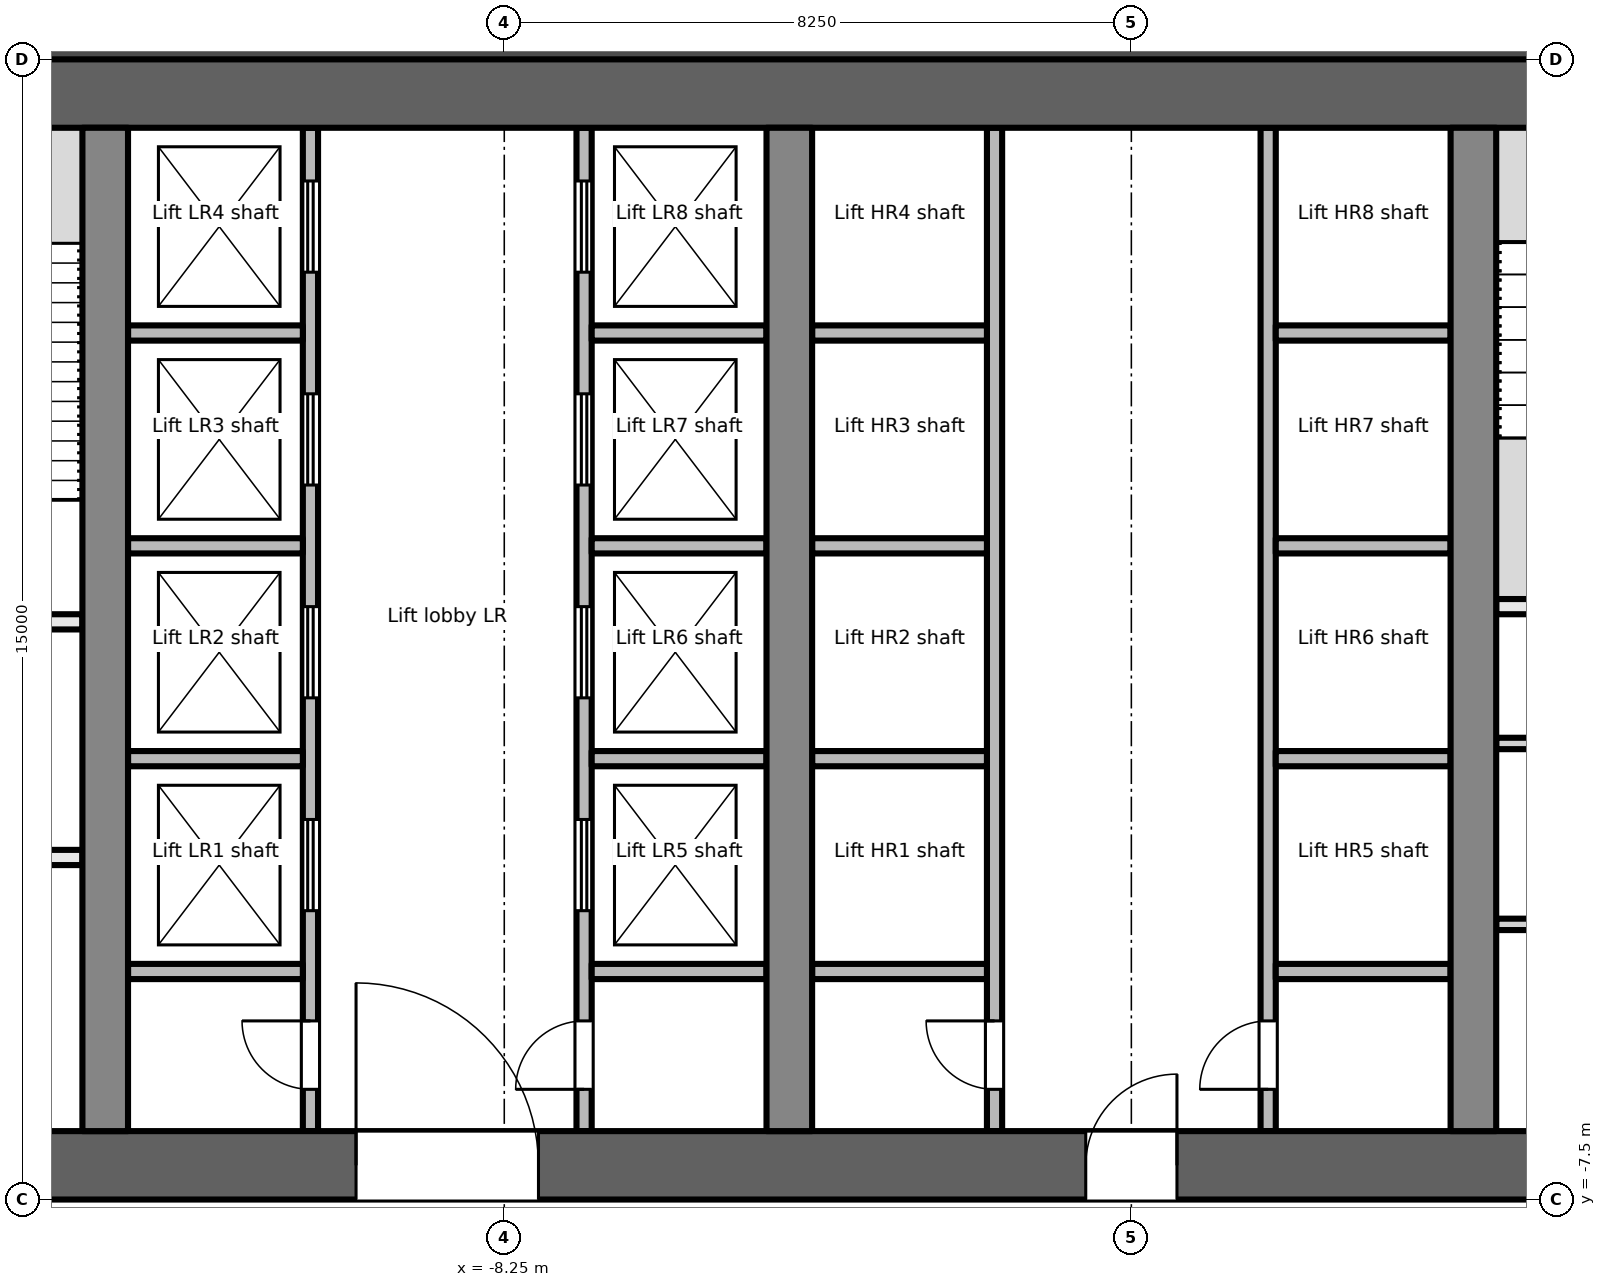
"""IFC4 building model, lengths in metres.
Left out: names, types, materials, properties, quantities, classifications, styles, units other than length and angle.
Written with IfcOpenShell. Run it as: python <this file> out.ifc"""

import sys

from ifc_helpers import new_model, si_unit, direction, frame, frame_2d, origin, place, context, subcontext, project, spatial, rectangle, extrude, element, fill, save


model = new_model("IFC4")
c1 = context("Model", 3, precision=1e-05, world=origin(), true_north=direction((0.0, 1.0)))
c2 = subcontext(c1, "Body", "Model", "MODEL_VIEW")
j1 = project(units=[si_unit("LENGTHUNIT", "METRE"), si_unit("PLANEANGLEUNIT", "RADIAN")], contexts=[c1])
p1 = place(None, origin())
s1 = spatial("IfcSite", under=j1, at=p1, CompositionType="ELEMENT")
p2 = place(p1, origin())
s2 = spatial("IfcBuilding", under=s1, at=p2, CompositionType="ELEMENT")
p3 = place(p2, frame((0.0, 0.0, 69.3)))
s3 = spatial("IfcBuildingStorey", under=s2, at=p3, CompositionType="ELEMENT", Elevation=69.3)
p4 = place(p3, frame((-18.0, -7.05, -0.2), z_axis=(0.0, 0.0, 1.0), x_axis=(1.0, 0.0, 0.0)))
e1 = element("IfcWall", 1, at=p4, inside=s3, PredefinedType="SHEAR", context=c2, shape_type="SweptSolid", body=[
    extrude(rectangle(XDim=36.0, YDim=0.9, at=frame_2d((18.0, 0.0))), origin(), (0.0, 0.0, 1.0), 5.0),
])
p5 = place(p4, frame((7.8, 0.0, 0.2)))
e2 = element("IfcOpeningElement", 2, at=p5, cuts=e1, PredefinedType="OPENING", context=c2, shape_type="SweptSolid", body=[
    extrude(rectangle(XDim=2.4, YDim=2.1, at=frame_2d((1.2, 1.05))), frame((0.0, 0.46, 0.0), z_axis=(0.0, -1.0, 0.0), x_axis=(1.0, 0.0, 0.0)), (0.0, 0.0, 1.0), 0.921),
])
p6 = place(p4, frame((17.4, 0.0, 0.2)))
e3 = element("IfcOpeningElement", 3, at=p6, cuts=e1, PredefinedType="OPENING", context=c2, shape_type="SweptSolid", body=[
    extrude(rectangle(XDim=1.2, YDim=2.1, at=frame_2d((0.6, 1.05))), frame((0.0, 0.46, 0.0), z_axis=(0.0, -1.0, 0.0), x_axis=(1.0, 0.0, 0.0)), (0.0, 0.0, 1.0), 0.921),
])
p7 = place(p4, frame((26.1, 0.0, 0.2)))
e4 = element("IfcOpeningElement", 4, at=p7, cuts=e1, PredefinedType="OPENING", context=c2, shape_type="SweptSolid", body=[
    extrude(rectangle(XDim=2.4, YDim=2.1, at=frame_2d((1.2, 1.05))), frame((0.0, 0.46, 0.0), z_axis=(0.0, -1.0, 0.0), x_axis=(1.0, 0.0, 0.0)), (0.0, 0.0, 1.0), 0.921),
])
p8 = place(p3, frame((-18.0, 7.05, -0.2), z_axis=(0.0, 0.0, 1.0), x_axis=(1.0, 0.0, 0.0)))
e5 = element("IfcWall", 5, at=p8, inside=s3, PredefinedType="SHEAR", context=c2, shape_type="SweptSolid", body=[
    extrude(rectangle(XDim=36.0, YDim=0.9, at=frame_2d((18.0, 0.0))), origin(), (0.0, 0.0, 1.0), 5.0),
])
for number, where, z_axis, x_axis in (
    (6, (-13.5, -6.6, -0.2), (0.0, 0.0, 1.0), (0.0, 1.0, 0.0)),
    (7, (-4.5, -6.6, -0.2), (0.0, 0.0, 1.0), (0.0, 1.0, 0.0)),
    (8, (4.5, -6.6, -0.2), (0.0, 0.0, 1.0), (0.0, 1.0, 0.0)),
):
    element("IfcWall", number, at=place(p3, frame(where, z_axis=z_axis, x_axis=x_axis)), inside=s3, PredefinedType="SHEAR", context=c2, shape_type="SweptSolid", body=[
        extrude(rectangle(XDim=13.2, YDim=0.6, at=frame_2d((6.6, 0.0))), origin(), (0.0, 0.0, 1.0), 5.0),
    ])
p9 = place(p3, frame((-17.1, -3.0, 0.0), z_axis=(0.0, 0.0, 1.0), x_axis=(1.0, 0.0, 0.0)))
e9 = element("IfcWall", 9, at=p9, inside=s3, PredefinedType="PARTITIONING", context=c2, shape_type="SweptSolid", body=[
    extrude(rectangle(XDim=3.3, YDim=0.2, at=frame_2d((1.65, 0.0))), origin(), (0.0, 0.0, 1.0), 4.8),
])
p10 = place(p9, frame((1.1, 0.0, 0.0)))
e10 = element("IfcOpeningElement", 10, at=p10, cuts=e9, PredefinedType="OPENING", context=c2, shape_type="SweptSolid", body=[
    extrude(rectangle(XDim=1.1, YDim=2.1, at=frame_2d((0.55, 1.05))), frame((0.0, 0.111, 0.0), z_axis=(0.0, -1.0, 0.0), x_axis=(1.0, 0.0, 0.0)), (0.0, 0.0, 1.0), 0.221),
])
p11 = place(p3, frame((-17.1, 0.1, 0.0), z_axis=(0.0, 0.0, 1.0), x_axis=(1.0, 0.0, 0.0)))
e11 = element("IfcWall", 11, at=p11, inside=s3, PredefinedType="PARTITIONING", context=c2, shape_type="SweptSolid", body=[
    extrude(rectangle(XDim=3.3, YDim=0.2, at=frame_2d((1.65, 0.0))), origin(), (0.0, 0.0, 1.0), 4.8),
])
p12 = place(p11, frame((1.1, 0.0, 0.0)))
e12 = element("IfcOpeningElement", 12, at=p12, cuts=e11, PredefinedType="OPENING", context=c2, shape_type="SweptSolid", body=[
    extrude(rectangle(XDim=1.1, YDim=2.1, at=frame_2d((0.55, 1.05))), frame((0.0, 0.111, 0.0), z_axis=(0.0, -1.0, 0.0), x_axis=(1.0, 0.0, 0.0)), (0.0, 0.0, 1.0), 0.221),
])
p13 = place(p3, frame((-10.8, -6.6, 0.0), z_axis=(0.0, 0.0, 1.0), x_axis=(0.0, 1.0, 0.0)))
e13 = element("IfcWall", 13, at=p13, inside=s3, PredefinedType="PARTITIONING", context=c2, shape_type="SweptSolid", body=[
    extrude(rectangle(XDim=13.2, YDim=0.2, at=frame_2d((6.6, 0.0))), origin(), (0.0, 0.0, 1.0), 4.8),
])
p14 = place(p13, frame((0.55, 0.0, 0.0)))
e14 = element("IfcOpeningElement", 14, at=p14, cuts=e13, PredefinedType="OPENING", context=c2, shape_type="SweptSolid", body=[
    extrude(rectangle(XDim=0.9, YDim=2.1, at=frame_2d((0.45, 1.05))), frame((0.0, 0.111, 0.0), z_axis=(0.0, -1.0, 0.0), x_axis=(1.0, 0.0, 0.0)), (0.0, 0.0, 1.0), 0.221),
])
p15 = place(p13, frame((2.9, 0.0, 0.0)))
e15 = element("IfcOpeningElement", 15, at=p15, cuts=e13, PredefinedType="OPENING", context=c2, shape_type="SweptSolid", body=[
    extrude(rectangle(XDim=1.2, YDim=2.1, at=frame_2d((0.6, 1.05))), frame((0.0, 0.111, 0.0), z_axis=(0.0, -1.0, 0.0), x_axis=(1.0, 0.0, 0.0)), (0.0, 0.0, 1.0), 0.221),
])
p16 = place(p13, frame((5.7, 0.0, 0.0)))
e16 = element("IfcOpeningElement", 16, at=p16, cuts=e13, PredefinedType="OPENING", context=c2, shape_type="SweptSolid", body=[
    extrude(rectangle(XDim=1.2, YDim=2.1, at=frame_2d((0.6, 1.05))), frame((0.0, 0.111, 0.0), z_axis=(0.0, -1.0, 0.0), x_axis=(1.0, 0.0, 0.0)), (0.0, 0.0, 1.0), 0.221),
])
p17 = place(p13, frame((8.5, 0.0, 0.0)))
e17 = element("IfcOpeningElement", 17, at=p17, cuts=e13, PredefinedType="OPENING", context=c2, shape_type="SweptSolid", body=[
    extrude(rectangle(XDim=1.2, YDim=2.1, at=frame_2d((0.6, 1.05))), frame((0.0, 0.111, 0.0), z_axis=(0.0, -1.0, 0.0), x_axis=(1.0, 0.0, 0.0)), (0.0, 0.0, 1.0), 0.221),
])
p18 = place(p13, frame((11.3, 0.0, 0.0)))
e18 = element("IfcOpeningElement", 18, at=p18, cuts=e13, PredefinedType="OPENING", context=c2, shape_type="SweptSolid", body=[
    extrude(rectangle(XDim=1.2, YDim=2.1, at=frame_2d((0.6, 1.05))), frame((0.0, 0.111, 0.0), z_axis=(0.0, -1.0, 0.0), x_axis=(1.0, 0.0, 0.0)), (0.0, 0.0, 1.0), 0.221),
])
p19 = place(p3, frame((-7.2, -6.6, 0.0), z_axis=(0.0, 0.0, 1.0), x_axis=(0.0, 1.0, 0.0)))
e19 = element("IfcWall", 19, at=p19, inside=s3, PredefinedType="PARTITIONING", context=c2, shape_type="SweptSolid", body=[
    extrude(rectangle(XDim=13.2, YDim=0.2, at=frame_2d((6.6, 0.0))), origin(), (0.0, 0.0, 1.0), 4.8),
])
p20 = place(p19, frame((0.55, 0.0, 0.0)))
e20 = element("IfcOpeningElement", 20, at=p20, cuts=e19, PredefinedType="OPENING", context=c2, shape_type="SweptSolid", body=[
    extrude(rectangle(XDim=0.9, YDim=2.1, at=frame_2d((0.45, 1.05))), frame((0.0, 0.111, 0.0), z_axis=(0.0, -1.0, 0.0), x_axis=(1.0, 0.0, 0.0)), (0.0, 0.0, 1.0), 0.221),
])
p21 = place(p19, frame((2.9, 0.0, 0.0)))
e21 = element("IfcOpeningElement", 21, at=p21, cuts=e19, PredefinedType="OPENING", context=c2, shape_type="SweptSolid", body=[
    extrude(rectangle(XDim=1.2, YDim=2.1, at=frame_2d((0.6, 1.05))), frame((0.0, 0.111, 0.0), z_axis=(0.0, -1.0, 0.0), x_axis=(1.0, 0.0, 0.0)), (0.0, 0.0, 1.0), 0.221),
])
p22 = place(p19, frame((5.7, 0.0, 0.0)))
e22 = element("IfcOpeningElement", 22, at=p22, cuts=e19, PredefinedType="OPENING", context=c2, shape_type="SweptSolid", body=[
    extrude(rectangle(XDim=1.2, YDim=2.1, at=frame_2d((0.6, 1.05))), frame((0.0, 0.111, 0.0), z_axis=(0.0, -1.0, 0.0), x_axis=(1.0, 0.0, 0.0)), (0.0, 0.0, 1.0), 0.221),
])
p23 = place(p19, frame((8.5, 0.0, 0.0)))
e23 = element("IfcOpeningElement", 23, at=p23, cuts=e19, PredefinedType="OPENING", context=c2, shape_type="SweptSolid", body=[
    extrude(rectangle(XDim=1.2, YDim=2.1, at=frame_2d((0.6, 1.05))), frame((0.0, 0.111, 0.0), z_axis=(0.0, -1.0, 0.0), x_axis=(1.0, 0.0, 0.0)), (0.0, 0.0, 1.0), 0.221),
])
p24 = place(p19, frame((11.3, 0.0, 0.0)))
e24 = element("IfcOpeningElement", 24, at=p24, cuts=e19, PredefinedType="OPENING", context=c2, shape_type="SweptSolid", body=[
    extrude(rectangle(XDim=1.2, YDim=2.1, at=frame_2d((0.6, 1.05))), frame((0.0, 0.111, 0.0), z_axis=(0.0, -1.0, 0.0), x_axis=(1.0, 0.0, 0.0)), (0.0, 0.0, 1.0), 0.221),
])
for number, where, z_axis, x_axis in (
    (25, (-13.2, -1.7, 0.0), (0.0, 0.0, 1.0), (1.0, 0.0, 0.0)),
    (26, (-13.2, 1.1, 0.0), (0.0, 0.0, 1.0), (1.0, 0.0, 0.0)),
    (27, (-13.2, 3.9, 0.0), (0.0, 0.0, 1.0), (1.0, 0.0, 0.0)),
    (28, (-13.2, -4.5, 0.0), (0.0, 0.0, 1.0), (1.0, 0.0, 0.0)),
    (29, (-7.1, -1.7, 0.0), (0.0, 0.0, 1.0), (1.0, 0.0, 0.0)),
    (30, (-7.1, 1.1, 0.0), (0.0, 0.0, 1.0), (1.0, 0.0, 0.0)),
    (31, (-7.1, 3.9, 0.0), (0.0, 0.0, 1.0), (1.0, 0.0, 0.0)),
    (32, (-7.1, -4.5, 0.0), (0.0, 0.0, 1.0), (1.0, 0.0, 0.0)),
):
    element("IfcWall", number, at=place(p3, frame(where, z_axis=z_axis, x_axis=x_axis)), inside=s3, PredefinedType="PARTITIONING", context=c2, shape_type="SweptSolid", body=[
        extrude(rectangle(XDim=2.3, YDim=0.2, at=frame_2d((1.15, 0.0))), origin(), (0.0, 0.0, 1.0), 4.8),
    ])
p25 = place(p3, frame((-1.8, -6.6, 0.0), z_axis=(0.0, 0.0, 1.0), x_axis=(0.0, 1.0, 0.0)))
e33 = element("IfcWall", 33, at=p25, inside=s3, PredefinedType="PARTITIONING", context=c2, shape_type="SweptSolid", body=[
    extrude(rectangle(XDim=13.2, YDim=0.2, at=frame_2d((6.6, 0.0))), origin(), (0.0, 0.0, 1.0), 4.8),
])
p26 = place(p25, frame((0.55, 0.0, 0.0)))
e34 = element("IfcOpeningElement", 34, at=p26, cuts=e33, PredefinedType="OPENING", context=c2, shape_type="SweptSolid", body=[
    extrude(rectangle(XDim=0.9, YDim=2.1, at=frame_2d((0.45, 1.05))), frame((0.0, 0.111, 0.0), z_axis=(0.0, -1.0, 0.0), x_axis=(1.0, 0.0, 0.0)), (0.0, 0.0, 1.0), 0.221),
])
p27 = place(p3, frame((1.8, -6.6, 0.0), z_axis=(0.0, 0.0, 1.0), x_axis=(0.0, 1.0, 0.0)))
e35 = element("IfcWall", 35, at=p27, inside=s3, PredefinedType="PARTITIONING", context=c2, shape_type="SweptSolid", body=[
    extrude(rectangle(XDim=13.2, YDim=0.2, at=frame_2d((6.6, 0.0))), origin(), (0.0, 0.0, 1.0), 4.8),
])
p28 = place(p27, frame((0.55, 0.0, 0.0)))
e36 = element("IfcOpeningElement", 36, at=p28, cuts=e35, PredefinedType="OPENING", context=c2, shape_type="SweptSolid", body=[
    extrude(rectangle(XDim=0.9, YDim=2.1, at=frame_2d((0.45, 1.05))), frame((0.0, 0.111, 0.0), z_axis=(0.0, -1.0, 0.0), x_axis=(1.0, 0.0, 0.0)), (0.0, 0.0, 1.0), 0.221),
])
for number, where, z_axis, x_axis in (
    (37, (-4.2, -1.7, 0.0), (0.0, 0.0, 1.0), (1.0, 0.0, 0.0)),
    (38, (-4.2, 1.1, 0.0), (0.0, 0.0, 1.0), (1.0, 0.0, 0.0)),
    (39, (-4.2, 3.9, 0.0), (0.0, 0.0, 1.0), (1.0, 0.0, 0.0)),
    (40, (-4.2, -4.5, 0.0), (0.0, 0.0, 1.0), (1.0, 0.0, 0.0)),
    (41, (1.9, -1.7, 0.0), (0.0, 0.0, 1.0), (1.0, 0.0, 0.0)),
    (42, (1.9, 1.1, 0.0), (0.0, 0.0, 1.0), (1.0, 0.0, 0.0)),
    (43, (1.9, 3.9, 0.0), (0.0, 0.0, 1.0), (1.0, 0.0, 0.0)),
    (44, (1.9, -4.5, 0.0), (0.0, 0.0, 1.0), (1.0, 0.0, 0.0)),
):
    element("IfcWall", number, at=place(p3, frame(where, z_axis=z_axis, x_axis=x_axis)), inside=s3, PredefinedType="PARTITIONING", context=c2, shape_type="SweptSolid", body=[
        extrude(rectangle(XDim=2.3, YDim=0.2, at=frame_2d((1.15, 0.0))), origin(), (0.0, 0.0, 1.0), 4.8),
    ])
p29 = place(p3, frame((4.8, 0.3, 0.0), z_axis=(0.0, 0.0, 1.0), x_axis=(1.0, 0.0, 0.0)))
e45 = element("IfcWall", 45, at=p29, inside=s3, PredefinedType="PARTITIONING", context=c2, shape_type="SweptSolid", body=[
    extrude(rectangle(XDim=3.15, YDim=0.2, at=frame_2d((1.575, 0.0))), origin(), (0.0, 0.0, 1.0), 4.8),
])
for number, where, z_axis, x_axis in (
    (46, (4.8, -3.88, 0.0), (0.0, 0.0, 1.0), (1.0, 0.0, 0.0)),
    (47, (4.8, -1.5, 0.0), (0.0, 0.0, 1.0), (1.0, 0.0, 0.0)),
):
    element("IfcWall", number, at=place(p3, frame(where, z_axis=z_axis, x_axis=x_axis)), inside=s3, PredefinedType="PARTITIONING", context=c2, shape_type="SweptSolid", body=[
        extrude(rectangle(XDim=3.15, YDim=0.15, at=frame_2d((1.575, 0.0))), origin(), (0.0, 0.0, 1.0), 4.8),
    ])
p30 = place(p3, frame((-17.82, 7.564, 0.0), z_axis=(0.0, 0.0, 1.0), x_axis=(1.0, 0.0, 0.0)))
e48 = element("IfcWall", 48, at=p30, inside=s3, PredefinedType="PARTITIONING", context=c2, shape_type="SweptSolid", body=[
    extrude(rectangle(XDim=38.12, YDim=0.15, at=frame_2d((19.06, 0.0))), origin(), (0.0, 0.0, 1.0), 2.75),
])
p31 = place(p14, origin())
e49 = element("IfcDoor", 49, at=p31, inside=s3, OperationType="SINGLE_SWING_RIGHT", PredefinedType="DOOR", context=c2, shape_type="SweptSolid", body=[
    extrude(rectangle(XDim=0.9, YDim=2.1, at=frame_2d((0.45, 1.05))), frame((0.0, 0.025, 0.0), z_axis=(0.0, -1.0, 0.0), x_axis=(1.0, 0.0, 0.0)), (0.0, 0.0, 1.0), 0.05),
])
fill(e14, e49)
p32 = place(p15, origin())
e50 = element("IfcDoor", 50, at=p32, inside=s3, OperationType="DOUBLE_DOOR_SLIDING", PredefinedType="DOOR", context=c2, shape_type="SweptSolid", body=[
    extrude(rectangle(XDim=1.2, YDim=2.1, at=frame_2d((0.6, 1.05))), frame((0.0, 0.025, 0.0), z_axis=(0.0, -1.0, 0.0), x_axis=(1.0, 0.0, 0.0)), (0.0, 0.0, 1.0), 0.05),
])
fill(e15, e50)
p33 = place(p16, origin())
e51 = element("IfcDoor", 51, at=p33, inside=s3, OperationType="DOUBLE_DOOR_SLIDING", PredefinedType="DOOR", context=c2, shape_type="SweptSolid", body=[
    extrude(rectangle(XDim=1.2, YDim=2.1, at=frame_2d((0.6, 1.05))), frame((0.0, 0.025, 0.0), z_axis=(0.0, -1.0, 0.0), x_axis=(1.0, 0.0, 0.0)), (0.0, 0.0, 1.0), 0.05),
])
fill(e16, e51)
p34 = place(p17, origin())
e52 = element("IfcDoor", 52, at=p34, inside=s3, OperationType="DOUBLE_DOOR_SLIDING", PredefinedType="DOOR", context=c2, shape_type="SweptSolid", body=[
    extrude(rectangle(XDim=1.2, YDim=2.1, at=frame_2d((0.6, 1.05))), frame((0.0, 0.025, 0.0), z_axis=(0.0, -1.0, 0.0), x_axis=(1.0, 0.0, 0.0)), (0.0, 0.0, 1.0), 0.05),
])
fill(e17, e52)
p35 = place(p18, origin())
e53 = element("IfcDoor", 53, at=p35, inside=s3, OperationType="DOUBLE_DOOR_SLIDING", PredefinedType="DOOR", context=c2, shape_type="SweptSolid", body=[
    extrude(rectangle(XDim=1.2, YDim=2.1, at=frame_2d((0.6, 1.05))), frame((0.0, 0.025, 0.0), z_axis=(0.0, -1.0, 0.0), x_axis=(1.0, 0.0, 0.0)), (0.0, 0.0, 1.0), 0.05),
])
fill(e18, e53)
p36 = place(p20, origin())
e54 = element("IfcDoor", 54, at=p36, inside=s3, OperationType="SINGLE_SWING_LEFT", PredefinedType="DOOR", context=c2, shape_type="SweptSolid", body=[
    extrude(rectangle(XDim=0.9, YDim=2.1, at=frame_2d((0.45, 1.05))), frame((0.0, 0.025, 0.0), z_axis=(0.0, -1.0, 0.0), x_axis=(1.0, 0.0, 0.0)), (0.0, 0.0, 1.0), 0.05),
])
fill(e20, e54)
p37 = place(p21, origin())
e55 = element("IfcDoor", 55, at=p37, inside=s3, OperationType="DOUBLE_DOOR_SLIDING", PredefinedType="DOOR", context=c2, shape_type="SweptSolid", body=[
    extrude(rectangle(XDim=1.2, YDim=2.1, at=frame_2d((0.6, 1.05))), frame((0.0, 0.025, 0.0), z_axis=(0.0, -1.0, 0.0), x_axis=(1.0, 0.0, 0.0)), (0.0, 0.0, 1.0), 0.05),
])
fill(e21, e55)
p38 = place(p22, origin())
e56 = element("IfcDoor", 56, at=p38, inside=s3, OperationType="DOUBLE_DOOR_SLIDING", PredefinedType="DOOR", context=c2, shape_type="SweptSolid", body=[
    extrude(rectangle(XDim=1.2, YDim=2.1, at=frame_2d((0.6, 1.05))), frame((0.0, 0.025, 0.0), z_axis=(0.0, -1.0, 0.0), x_axis=(1.0, 0.0, 0.0)), (0.0, 0.0, 1.0), 0.05),
])
fill(e22, e56)
p39 = place(p23, origin())
e57 = element("IfcDoor", 57, at=p39, inside=s3, OperationType="DOUBLE_DOOR_SLIDING", PredefinedType="DOOR", context=c2, shape_type="SweptSolid", body=[
    extrude(rectangle(XDim=1.2, YDim=2.1, at=frame_2d((0.6, 1.05))), frame((0.0, 0.025, 0.0), z_axis=(0.0, -1.0, 0.0), x_axis=(1.0, 0.0, 0.0)), (0.0, 0.0, 1.0), 0.05),
])
fill(e23, e57)
p40 = place(p24, origin())
e58 = element("IfcDoor", 58, at=p40, inside=s3, OperationType="DOUBLE_DOOR_SLIDING", PredefinedType="DOOR", context=c2, shape_type="SweptSolid", body=[
    extrude(rectangle(XDim=1.2, YDim=2.1, at=frame_2d((0.6, 1.05))), frame((0.0, 0.025, 0.0), z_axis=(0.0, -1.0, 0.0), x_axis=(1.0, 0.0, 0.0)), (0.0, 0.0, 1.0), 0.05),
])
fill(e24, e58)
p41 = place(p5, origin())
e59 = element("IfcDoor", 59, at=p41, inside=s3, OperationType="DOUBLE_DOOR_DOUBLE_SWING", PredefinedType="DOOR", context=c2, shape_type="SweptSolid", body=[
    extrude(rectangle(XDim=2.4, YDim=2.1, at=frame_2d((1.2, 1.05))), frame((0.0, 0.025, 0.0), z_axis=(0.0, -1.0, 0.0), x_axis=(1.0, 0.0, 0.0)), (0.0, 0.0, 1.0), 0.05),
])
fill(e2, e59)
p42 = place(p26, origin())
e60 = element("IfcDoor", 60, at=p42, inside=s3, OperationType="SINGLE_SWING_RIGHT", PredefinedType="DOOR", context=c2, shape_type="SweptSolid", body=[
    extrude(rectangle(XDim=0.9, YDim=2.1, at=frame_2d((0.45, 1.05))), frame((0.0, 0.025, 0.0), z_axis=(0.0, -1.0, 0.0), x_axis=(1.0, 0.0, 0.0)), (0.0, 0.0, 1.0), 0.05),
])
fill(e34, e60)
p43 = place(p28, origin())
e61 = element("IfcDoor", 61, at=p43, inside=s3, OperationType="SINGLE_SWING_LEFT", PredefinedType="DOOR", context=c2, shape_type="SweptSolid", body=[
    extrude(rectangle(XDim=0.9, YDim=2.1, at=frame_2d((0.45, 1.05))), frame((0.0, 0.025, 0.0), z_axis=(0.0, -1.0, 0.0), x_axis=(1.0, 0.0, 0.0)), (0.0, 0.0, 1.0), 0.05),
])
fill(e36, e61)
p44 = place(p6, origin())
e62 = element("IfcDoor", 62, at=p44, inside=s3, OperationType="SINGLE_SWING_RIGHT", PredefinedType="DOOR", context=c2, shape_type="SweptSolid", body=[
    extrude(rectangle(XDim=1.2, YDim=2.1, at=frame_2d((0.6, 1.05))), frame((0.0, 0.025, 0.0), z_axis=(0.0, -1.0, 0.0), x_axis=(1.0, 0.0, 0.0)), (0.0, 0.0, 1.0), 0.05),
])
fill(e3, e62)
save(model, sys.argv[1])
